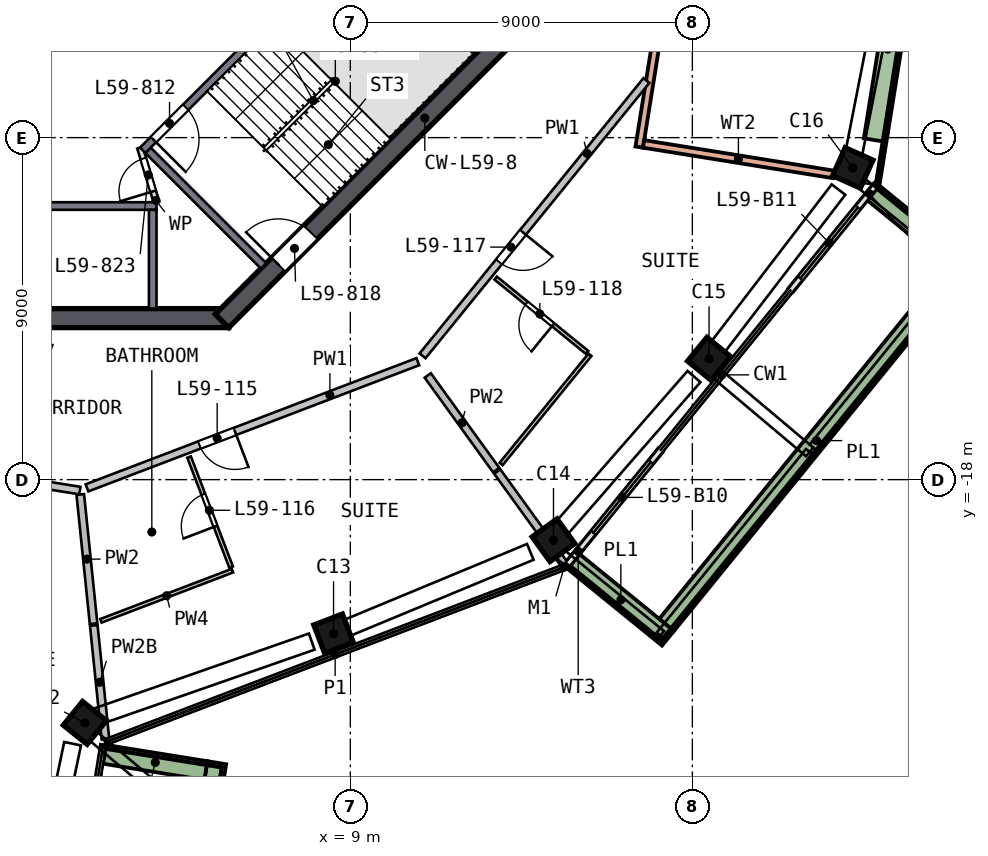
"""IFC4 building model, lengths in metres.
Left out: names, types, materials, properties, quantities, classifications, styles, units other than length and angle.
Written with IfcOpenShell. Run it as: python <this file> out.ifc"""

import sys

from ifc_helpers import new_model, si_unit, direction, frame, frame_2d, origin, origin_2d, place, context, subcontext, project, spatial, rectangle, extrude, element, fill, save


model = new_model("IFC4")
c1 = context("Model", 3, precision=1e-05, world=origin(), true_north=direction((0.0, 1.0)))
c2 = subcontext(c1, "Body", "Model", "MODEL_VIEW")
j1 = project(units=[si_unit("LENGTHUNIT", "METRE"), si_unit("PLANEANGLEUNIT", "RADIAN")], contexts=[c1])
p1 = place(None, origin())
s1 = spatial("IfcSite", under=j1, at=p1, CompositionType="ELEMENT")
p2 = place(p1, origin())
s2 = spatial("IfcBuilding", under=s1, at=p2, CompositionType="ELEMENT")
p3 = place(p2, frame((0.0, 0.0, 241.0)))
s3 = spatial("IfcBuildingStorey", under=s2, at=p3, CompositionType="ELEMENT", Elevation=241.0)
p4 = place(p3, frame((1.874, -24.414, 0.0), z_axis=(0.115997442, 0.009957841, 0.993199595), x_axis=(-0.623107576, -0.777974818, 0.080573769)))
e1 = element("IfcColumn", 1, at=p4, inside=s3, PredefinedType="COLUMN", context=c2, shape_type="SweptSolid", body=[
    extrude(rectangle(XDim=0.8, YDim=0.8, at=origin_2d()), origin(), (0.0, 0.0, 1.0), 3.212),
])
p5 = place(p3, frame((8.432, -22.105, 0.0), z_axis=(0.104794735, 0.040990103, 0.993648768), x_axis=(0.928416268, 0.354093219, -0.112522108)))
e2 = element("IfcColumn", 2, at=p5, inside=s3, PredefinedType="COLUMN", context=c2, shape_type="SweptSolid", body=[
    extrude(rectangle(XDim=0.8, YDim=0.8, at=origin_2d()), origin(), (0.0, 0.0, 1.0), 3.21),
])
p6 = place(p3, frame((14.234, -19.677, 0.0), z_axis=(0.092975475, 0.068496241, 0.993309532), x_axis=(-0.804692577, -0.582352668, 0.115478247)))
e3 = element("IfcColumn", 3, at=p6, inside=s3, PredefinedType="COLUMN", context=c2, shape_type="SweptSolid", body=[
    extrude(rectangle(XDim=0.8, YDim=0.8, at=origin_2d()), origin(), (0.0, 0.0, 1.0), 3.211),
])
p7 = place(p3, frame((18.355, -14.927, 0.0), z_axis=(0.070269074, 0.087836342, 0.993653377), x_axis=(0.627292241, 0.770618179, -0.112481404)))
e4 = element("IfcColumn", 4, at=p7, inside=s3, PredefinedType="COLUMN", context=c2, shape_type="SweptSolid", body=[
    extrude(rectangle(XDim=0.8, YDim=0.8, at=origin_2d()), origin(), (0.0, 0.0, 1.0), 3.21),
])
p8 = place(p3, frame((22.166, -9.924, 0.0), z_axis=(0.046297918, 0.10574779, 0.993314607), x_axis=(-0.406090601, -0.906512702, 0.115434589)))
e5 = element("IfcColumn", 5, at=p8, inside=s3, PredefinedType="COLUMN", context=c2, shape_type="SweptSolid", body=[
    extrude(rectangle(XDim=0.8, YDim=0.8, at=origin_2d()), origin(), (0.0, 0.0, 1.0), 3.211),
])
p9 = place(p3, frame((-5.799, -13.75, 0.0), z_axis=(0.0, 0.0, 1.0), x_axis=(1.0, 0.0, 0.0)))
e6 = element("IfcWall", 6, at=p9, inside=s3, PredefinedType="SHEAR", context=c2, shape_type="SweptSolid", body=[
    extrude(rectangle(XDim=11.598, YDim=0.5, at=frame_2d((5.799, 0.0))), origin(), (0.0, 0.0, 1.0), 3.5),
])
p10 = place(p3, frame((5.622, -13.823, 0.0), z_axis=(0.0, 0.0, 1.0), x_axis=(0.707106781, 0.707106781, 0.0)))
e7 = element("IfcWall", 7, at=p10, inside=s3, PredefinedType="SHEAR", context=c2, shape_type="SweptSolid", body=[
    extrude(rectangle(XDim=11.598, YDim=0.5, at=frame_2d((5.799, 0.0))), origin(), (0.0, 0.0, 1.0), 3.5),
])
p11 = place(p10, frame((2.099, 0.0, 0.0)))
e8 = element("IfcOpeningElement", 8, at=p11, cuts=e7, PredefinedType="OPENING", context=c2, shape_type="SweptSolid", body=[
    extrude(rectangle(XDim=1.2, YDim=2.1, at=frame_2d((0.6, 1.05))), frame((0.0, 0.26, 0.0), z_axis=(0.0, -1.0, 0.0), x_axis=(1.0, 0.0, 0.0)), (0.0, 0.0, 1.0), 0.52),
])
p12 = place(p3, frame((14.724, -20.224, 0.0), z_axis=(0.0, 0.0, 1.0), x_axis=(0.630963708, 0.775812348, 0.0)))
e9 = element("IfcWall", 9, at=p12, inside=s3, PredefinedType="SOLIDWALL", context=c2, shape_type="SweptSolid", body=[
    extrude(rectangle(XDim=3.863, YDim=0.15, at=frame_2d((1.932, 0.0))), origin(), (0.0, 0.0, 1.0), 2.525),
])
p13 = place(p12, frame((1.063, 0.0, 0.0)))
e10 = element("IfcOpeningElement", 10, at=p13, cuts=e9, PredefinedType="OPENING", context=c2, shape_type="SweptSolid", body=[
    extrude(rectangle(XDim=2.4, YDim=2.4, at=frame_2d((1.2, 1.2))), frame((0.0, 0.085, 0.0), z_axis=(0.0, -1.0, 0.0), x_axis=(1.0, 0.0, 0.0)), (0.0, 0.0, 1.0), 0.17),
])
p14 = place(p3, frame((20.589, -13.012, 0.0), z_axis=(0.0, 0.0, 1.0), x_axis=(0.630958196, 0.77581683, 0.0)))
e11 = element("IfcWall", 11, at=p14, inside=s3, PredefinedType="SOLIDWALL", context=c2, shape_type="SweptSolid", body=[
    extrude(rectangle(XDim=3.544, YDim=0.15, at=frame_2d((1.772, 0.0))), origin(), (0.0, 0.0, 1.0), 2.525),
])
p15 = place(p14, frame((0.4, 0.0, 0.0)))
e12 = element("IfcOpeningElement", 12, at=p15, cuts=e11, PredefinedType="OPENING", context=c2, shape_type="SweptSolid", body=[
    extrude(rectangle(XDim=2.4, YDim=2.4, at=frame_2d((1.2, 1.2))), frame((0.0, 0.085, 0.0), z_axis=(0.0, -1.0, 0.0), x_axis=(1.0, 0.0, 0.0)), (0.0, 0.0, 1.0), 0.17),
])
p16 = place(p3, frame((4.0, -34.704, 0.0), z_axis=(0.0, 0.0, 1.0), x_axis=(0.15850352, 0.987358412, 0.0)))
e13 = element("IfcWall", 13, at=p16, inside=s3, PredefinedType="SOLIDWALL", context=c2, shape_type="SweptSolid", body=[
    extrude(rectangle(XDim=9.373, YDim=0.5, at=frame_2d((4.686, 0.0))), origin(), (0.0, 0.0, 1.0), 0.7),
])
p17 = place(p3, frame((5.199, -25.657, 0.0), z_axis=(0.0, 0.0, 1.0), x_axis=(-0.98736148, 0.158484408, 0.0)))
e14 = element("IfcWall", 14, at=p17, inside=s3, PredefinedType="SOLIDWALL", context=c2, shape_type="SweptSolid", body=[
    extrude(rectangle(XDim=2.699, YDim=0.5, at=frame_2d((1.35, 0.0))), origin(), (0.0, 0.0, 1.0), 0.7),
])
p18 = place(p3, frame((14.878, -20.155, 0.0), z_axis=(0.0, 0.0, 1.0), x_axis=(0.775817424, -0.630957466, 0.0)))
e15 = element("IfcWall", 15, at=p18, inside=s3, PredefinedType="SOLIDWALL", context=c2, shape_type="SweptSolid", body=[
    extrude(rectangle(XDim=3.199, YDim=0.5, at=frame_2d((1.599, 0.0))), origin(), (0.0, 0.0, 1.0), 0.7),
])
p19 = place(p3, frame((17.323, -21.822, 0.0), z_axis=(0.0, 0.0, 1.0), x_axis=(0.63094623, 0.775826562, 0.0)))
e16 = element("IfcWall", 16, at=p19, inside=s3, PredefinedType="SOLIDWALL", context=c2, shape_type="SweptSolid", body=[
    extrude(rectangle(XDim=12.5, YDim=0.5, at=frame_2d((6.25, 0.0))), origin(), (0.0, 0.0, 1.0), 0.7),
])
p20 = place(p3, frame((24.858, -12.16, 0.0), z_axis=(0.0, 0.0, 1.0), x_axis=(-0.775840005, 0.6309297, 0.0)))
e17 = element("IfcWall", 17, at=p20, inside=s3, PredefinedType="SOLIDWALL", context=c2, shape_type="SweptSolid", body=[
    extrude(rectangle(XDim=2.699, YDim=0.5, at=frame_2d((1.35, 0.0))), origin(), (0.0, 0.0, 1.0), 0.7),
])
p21 = place(p3, frame((18.663, 3.587, 0.0), z_axis=(0.0, 0.0, 1.0), x_axis=(-0.158503194, -0.987358464, 0.0)))
e18 = element("IfcWall", 18, at=p21, inside=s3, PredefinedType="SOLIDWALL", context=c2, shape_type="SweptSolid", body=[
    extrude(rectangle(XDim=13.0, YDim=0.2, at=frame_2d((6.5, 0.0))), origin(), (0.0, 0.0, 1.0), 3.19),
])
p22 = place(p21, frame((5.6, 0.0, 0.0)))
e19 = element("IfcOpeningElement", 19, at=p22, cuts=e18, PredefinedType="OPENING", context=c2, shape_type="SweptSolid", body=[
    extrude(rectangle(XDim=1.8, YDim=2.4, at=frame_2d((0.9, 1.2))), frame((0.0, 0.11, 0.0), z_axis=(0.0, -1.0, 0.0), x_axis=(1.0, 0.0, 0.0)), (0.0, 0.0, 1.0), 0.22),
])
p23 = place(p3, frame((21.707, -9.967, 0.0), z_axis=(0.0, 0.0, 1.0), x_axis=(-0.987359411, 0.158497296, 0.0)))
e20 = element("IfcWall", 20, at=p23, inside=s3, PredefinedType="SOLIDWALL", context=c2, shape_type="SweptSolid", body=[
    extrude(rectangle(XDim=5.054, YDim=0.2, at=frame_2d((2.527, 0.0))), origin(), (0.0, 0.0, 1.0), 3.19),
])
p24 = place(p3, frame((22.885, -10.176, 0.0), z_axis=(0.0, 0.0, 1.0), x_axis=(0.158500684, 0.987358867, 0.0)))
e21 = element("IfcWall", 21, at=p24, inside=s3, PredefinedType="SOLIDWALL", context=c2, shape_type="SweptSolid", body=[
    extrude(rectangle(XDim=12.84, YDim=0.1, at=frame_2d((6.42, 0.0))), origin(), (0.0, 0.0, 1.0), 0.7),
])
p25 = place(p3, frame((22.76, -9.059, 0.0), z_axis=(0.0, 0.0, 1.0), x_axis=(0.158494452, 0.987359868, 0.0)))
e22 = element("IfcWall", 22, at=p25, inside=s3, PredefinedType="SOLIDWALL", context=c2, shape_type="SweptSolid", body=[
    extrude(rectangle(XDim=4.837, YDim=0.5, at=frame_2d((2.418, 0.0))), origin(), (0.0, 0.0, 1.0), 0.7),
])
p26 = place(p3, frame((-3.9, -10.8, 0.0), z_axis=(0.0, 0.0, 1.0), x_axis=(1.0, 0.0, 0.0)))
e23 = element("IfcWall", 23, at=p26, inside=s3, PredefinedType="SOLIDWALL", context=c2, shape_type="SweptSolid", body=[
    extrude(rectangle(XDim=7.8, YDim=0.2, at=frame_2d((3.9, 0.0))), origin(), (0.0, 0.0, 1.0), 3.19),
])
p27 = place(p26, frame((3.45, 0.0, 0.0)))
e24 = element("IfcOpeningElement", 24, at=p27, cuts=e23, PredefinedType="OPENING", context=c2, shape_type="SweptSolid", body=[
    extrude(rectangle(XDim=0.9, YDim=2.1, at=frame_2d((0.45, 1.05))), frame((0.0, 0.11, 0.0), z_axis=(0.0, -1.0, 0.0), x_axis=(1.0, 0.0, 0.0)), (0.0, 0.0, 1.0), 0.22),
])
p28 = place(p3, frame((3.8, -10.9, 0.0), z_axis=(0.0, 0.0, 1.0), x_axis=(0.0, -1.0, 0.0)))
e25 = element("IfcWall", 25, at=p28, inside=s3, PredefinedType="SOLIDWALL", context=c2, shape_type="SweptSolid", body=[
    extrude(rectangle(XDim=2.6, YDim=0.2, at=frame_2d((1.3, 0.0))), origin(), (0.0, 0.0, 1.0), 3.19),
])
p29 = place(p3, frame((9.629, -3.24, 0.0), z_axis=(0.0, 0.0, 1.0), x_axis=(-0.707120946, -0.707092617, 0.0)))
e26 = element("IfcWall", 26, at=p29, inside=s3, PredefinedType="SOLIDWALL", context=c2, shape_type="SweptSolid", body=[
    extrude(rectangle(XDim=8.618, YDim=0.2, at=frame_2d((4.309, 0.0))), origin(), (0.0, 0.0, 1.0), 3.19),
])
p30 = place(p29, frame((7.018, 0.0, 0.0)))
e27 = element("IfcOpeningElement", 27, at=p30, cuts=e26, PredefinedType="OPENING", context=c2, shape_type="SweptSolid", body=[
    extrude(rectangle(XDim=1.2, YDim=2.1, at=frame_2d((0.6, 1.05))), frame((0.0, 0.11, 0.0), z_axis=(0.0, -1.0, 0.0), x_axis=(1.0, 0.0, 0.0)), (0.0, 0.0, 1.0), 0.22),
])
for number, where, z_axis, x_axis in (
    (28, (3.677, -9.334, 0.0), (0.0, 0.0, 1.0), (0.707, -0.707, 0.0)),
    (29, (9.334, -3.677, 0.0), (0.0, 0.0, 1.0), (0.707, -0.707, 0.0)),
):
    element("IfcWall", number, at=place(p3, frame(where, z_axis=z_axis, x_axis=x_axis)), inside=s3, PredefinedType="SOLIDWALL", context=c2, shape_type="SweptSolid", body=[
        extrude(rectangle(XDim=4.3, YDim=0.2, at=frame_2d((2.15, 0.0))), origin(), (0.0, 0.0, 1.0), 3.19),
    ])
p31 = place(p3, frame((3.9, -10.7, 0.0), z_axis=(0.0, 0.0, 1.0), x_axis=(-0.289808785, 0.957084567, 0.0)))
e30 = element("IfcWall", 30, at=p31, inside=s3, PredefinedType="PARTITIONING", context=c2, shape_type="SweptSolid", body=[
    extrude(rectangle(XDim=1.501, YDim=0.15, at=frame_2d((0.75, 0.0))), origin(), (0.0, 0.0, 1.0), 3.19),
])
p32 = place(p31, frame((0.301, 0.0, 0.0)))
e31 = element("IfcOpeningElement", 31, at=p32, cuts=e30, PredefinedType="OPENING", context=c2, shape_type="SweptSolid", body=[
    extrude(rectangle(XDim=0.9, YDim=2.1, at=frame_2d((0.45, 1.05))), frame((0.0, 0.085, 0.0), z_axis=(0.0, -1.0, 0.0), x_axis=(1.0, 0.0, 0.0)), (0.0, 0.0, 1.0), 0.17),
])
p33 = place(p3, frame((1.883, -18.288, 0.0), z_axis=(0.0, 0.0, 1.0), x_axis=(-0.987356604, 0.158514786, 0.0)))
e32 = element("IfcWall", 32, at=p33, inside=s3, PredefinedType="SOLIDWALL", context=c2, shape_type="SweptSolid", body=[
    extrude(rectangle(XDim=9.316, YDim=0.2, at=frame_2d((4.658, 0.0))), origin(), (0.0, 0.0, 1.0), 3.19),
])
p34 = place(p33, frame((3.833, 0.0, 0.0)))
e33 = element("IfcOpeningElement", 33, at=p34, cuts=e32, PredefinedType="OPENING", context=c2, shape_type="SweptSolid", body=[
    extrude(rectangle(XDim=1.8, YDim=2.1, at=frame_2d((0.9, 1.05))), frame((0.0, 0.11, 0.0), z_axis=(0.0, -1.0, 0.0), x_axis=(1.0, 0.0, 0.0)), (0.0, 0.0, 1.0), 0.22),
])
p35 = place(p3, frame((10.775, -14.896, 0.0), z_axis=(0.0, 0.0, 1.0), x_axis=(-0.93432948, -0.356410469, 0.0)))
e34 = element("IfcWall", 34, at=p35, inside=s3, PredefinedType="SOLIDWALL", context=c2, shape_type="SweptSolid", body=[
    extrude(rectangle(XDim=9.317, YDim=0.2, at=frame_2d((4.658, 0.0))), origin(), (0.0, 0.0, 1.0), 3.19),
])
p36 = place(p35, frame((5.15, 0.0, 0.0)))
e35 = element("IfcOpeningElement", 35, at=p36, cuts=e34, PredefinedType="OPENING", context=c2, shape_type="SweptSolid", body=[
    extrude(rectangle(XDim=1.0, YDim=2.1, at=frame_2d((0.5, 1.05))), frame((0.0, 0.11, 0.0), z_axis=(0.0, -1.0, 0.0), x_axis=(1.0, 0.0, 0.0)), (0.0, 0.0, 1.0), 0.22),
])
p37 = place(p3, frame((16.792, -7.497, 0.0), z_axis=(0.0, 0.0, 1.0), x_axis=(-0.630941046, -0.775830778, 0.0)))
e36 = element("IfcWall", 36, at=p37, inside=s3, PredefinedType="SOLIDWALL", context=c2, shape_type="SweptSolid", body=[
    extrude(rectangle(XDim=9.337, YDim=0.2, at=frame_2d((4.668, 0.0))), origin(), (0.0, 0.0, 1.0), 3.19),
])
p38 = place(p37, frame((5.15, 0.0, 0.0)))
e37 = element("IfcOpeningElement", 37, at=p38, cuts=e36, PredefinedType="OPENING", context=c2, shape_type="SweptSolid", body=[
    extrude(rectangle(XDim=1.0, YDim=2.1, at=frame_2d((0.5, 1.05))), frame((0.0, 0.11, 0.0), z_axis=(0.0, -1.0, 0.0), x_axis=(1.0, 0.0, 0.0)), (0.0, 0.0, 1.0), 0.22),
])
p39 = place(p3, frame((1.894, -18.391, 0.0), z_axis=(0.0, 0.0, 1.0), x_axis=(0.102416674, -0.994741587, 0.0)))
e38 = element("IfcWall", 38, at=p39, inside=s3, PredefinedType="SOLIDWALL", context=c2, shape_type="SweptSolid", body=[
    extrude(rectangle(XDim=3.418, YDim=0.2, at=frame_2d((1.709, 0.0))), origin(), (0.0, 0.0, 1.0), 3.19),
])
p40 = place(p3, frame((2.249, -21.837, 0.0), z_axis=(0.0, 0.0, 1.0), x_axis=(0.102553406, -0.9947275, 0.0)))
e39 = element("IfcWall", 39, at=p40, inside=s3, PredefinedType="SOLIDWALL", context=c2, shape_type="SweptSolid", body=[
    extrude(rectangle(XDim=3.011, YDim=0.2, at=frame_2d((1.506, 0.0))), origin(), (0.0, 0.0, 1.0), 2.69),
])
p41 = place(p3, frame((11.037, -15.259, 0.0), z_axis=(0.0, 0.0, 1.0), x_axis=(0.586087623, -0.810247677, 0.0)))
e40 = element("IfcWall", 40, at=p41, inside=s3, PredefinedType="SOLIDWALL", context=c2, shape_type="SweptSolid", body=[
    extrude(rectangle(XDim=3.075, YDim=0.2, at=frame_2d((1.537, 0.0))), origin(), (0.0, 0.0, 1.0), 3.19),
])
p42 = place(p3, frame((12.866, -17.787, 0.0), z_axis=(0.0, 0.0, 1.0), x_axis=(0.586082417, -0.810251443, 0.0)))
e41 = element("IfcWall", 41, at=p42, inside=s3, PredefinedType="SOLIDWALL", context=c2, shape_type="SweptSolid", body=[
    extrude(rectangle(XDim=3.011, YDim=0.2, at=frame_2d((1.506, 0.0))), origin(), (0.0, 0.0, 1.0), 3.19),
])
p43 = place(p3, frame((5.898, -20.396, 0.0), z_axis=(0.0, 0.0, 1.0), x_axis=(-0.934312202, -0.356455759, 0.0)))
e42 = element("IfcWall", 42, at=p43, inside=s3, PredefinedType="PARTITIONING", context=c2, shape_type="SweptSolid", body=[
    extrude(rectangle(XDim=3.704, YDim=0.1, at=frame_2d((1.852, 0.0))), origin(), (0.0, 0.0, 1.0), 3.19),
])
p44 = place(p3, frame((5.863, -20.302, 0.0), z_axis=(0.0, 0.0, 1.0), x_axis=(-0.356391594, 0.93433668, 0.0)))
e43 = element("IfcWall", 43, at=p44, inside=s3, PredefinedType="PARTITIONING", context=c2, shape_type="SweptSolid", body=[
    extrude(rectangle(XDim=3.1, YDim=0.1, at=frame_2d((1.55, 0.0))), origin(), (0.0, 0.0, 1.0), 3.19),
])
p45 = place(p44, frame((1.15, 0.0, 0.0)))
e44 = element("IfcOpeningElement", 44, at=p45, cuts=e43, PredefinedType="OPENING", context=c2, shape_type="SweptSolid", body=[
    extrude(rectangle(XDim=0.9, YDim=2.1, at=frame_2d((0.45, 1.05))), frame((0.0, 0.06, 0.0), z_axis=(0.0, -1.0, 0.0), x_axis=(1.0, 0.0, 0.0)), (0.0, 0.0, 1.0), 0.12),
])
p46 = place(p3, frame((15.228, -14.651, 0.0), z_axis=(0.0, 0.0, 1.0), x_axis=(-0.775834504, 0.630936464, 0.0)))
e45 = element("IfcWall", 45, at=p46, inside=s3, PredefinedType="PARTITIONING", context=c2, shape_type="SweptSolid", body=[
    extrude(rectangle(XDim=3.1, YDim=0.1, at=frame_2d((1.55, 0.0))), origin(), (0.0, 0.0, 1.0), 3.19),
])
p47 = place(p46, frame((1.15, 0.0, 0.0)))
e46 = element("IfcOpeningElement", 46, at=p47, cuts=e45, PredefinedType="OPENING", context=c2, shape_type="SweptSolid", body=[
    extrude(rectangle(XDim=0.9, YDim=2.1, at=frame_2d((0.45, 1.05))), frame((0.0, 0.06, 0.0), z_axis=(0.0, -1.0, 0.0), x_axis=(1.0, 0.0, 0.0)), (0.0, 0.0, 1.0), 0.12),
])
p48 = place(p3, frame((15.306, -14.714, 0.0), z_axis=(0.0, 0.0, 1.0), x_axis=(-0.630952346, -0.775821588, 0.0)))
e47 = element("IfcWall", 47, at=p48, inside=s3, PredefinedType="PARTITIONING", context=c2, shape_type="SweptSolid", body=[
    extrude(rectangle(XDim=3.704, YDim=0.1, at=frame_2d((1.852, 0.0))), origin(), (0.0, 0.0, 1.0), 3.19),
])
p49 = place(p13, origin())
e48 = element("IfcDoor", 48, at=p49, inside=s3, OperationType="SLIDING_TO_LEFT", PredefinedType="DOOR", context=c2, shape_type="SweptSolid", body=[
    extrude(rectangle(XDim=2.4, YDim=2.4, at=frame_2d((1.2, 1.2))), frame((0.0, 0.025, 0.0), z_axis=(0.0, -1.0, 0.0), x_axis=(1.0, 0.0, 0.0)), (0.0, 0.0, 1.0), 0.05),
])
fill(e10, e48)
p50 = place(p15, origin())
e49 = element("IfcDoor", 49, at=p50, inside=s3, OperationType="SLIDING_TO_RIGHT", PredefinedType="DOOR", context=c2, shape_type="SweptSolid", body=[
    extrude(rectangle(XDim=2.4, YDim=2.4, at=frame_2d((1.2, 1.2))), frame((0.0, 0.025, 0.0), z_axis=(0.0, -1.0, 0.0), x_axis=(1.0, 0.0, 0.0)), (0.0, 0.0, 1.0), 0.05),
])
fill(e12, e49)
p51 = place(p30, origin())
e50 = element("IfcDoor", 50, at=p51, inside=s3, OperationType="SINGLE_SWING_RIGHT", PredefinedType="DOOR", context=c2, shape_type="SweptSolid", body=[
    extrude(rectangle(XDim=1.2, YDim=2.1, at=frame_2d((0.6, 1.05))), frame((0.0, 0.025, 0.0), z_axis=(0.0, -1.0, 0.0), x_axis=(1.0, 0.0, 0.0)), (0.0, 0.0, 1.0), 0.05),
])
fill(e27, e50)
p52 = place(p11, origin())
e51 = element("IfcDoor", 51, at=p52, inside=s3, OperationType="SINGLE_SWING_LEFT", PredefinedType="DOOR", context=c2, shape_type="SweptSolid", body=[
    extrude(rectangle(XDim=1.2, YDim=2.1, at=frame_2d((0.6, 1.05))), frame((0.0, 0.025, 0.0), z_axis=(0.0, -1.0, 0.0), x_axis=(1.0, 0.0, 0.0)), (0.0, 0.0, 1.0), 0.05),
])
fill(e8, e51)
p53 = place(p32, origin())
e52 = element("IfcDoor", 52, at=p53, inside=s3, OperationType="SINGLE_SWING_LEFT", PredefinedType="DOOR", context=c2, shape_type="SweptSolid", body=[
    extrude(rectangle(XDim=0.9, YDim=2.1, at=frame_2d((0.45, 1.05))), frame((0.0, 0.025, 0.0), z_axis=(0.0, -1.0, 0.0), x_axis=(1.0, 0.0, 0.0)), (0.0, 0.0, 1.0), 0.05),
])
fill(e31, e52)
p54 = place(p36, origin())
e53 = element("IfcDoor", 53, at=p54, inside=s3, OperationType="SINGLE_SWING_LEFT", PredefinedType="DOOR", context=c2, shape_type="SweptSolid", body=[
    extrude(rectangle(XDim=1.0, YDim=2.1, at=frame_2d((0.5, 1.05))), frame((0.0, 0.025, 0.0), z_axis=(0.0, -1.0, 0.0), x_axis=(1.0, 0.0, 0.0)), (0.0, 0.0, 1.0), 0.05),
])
fill(e35, e53)
p55 = place(p45, origin())
e54 = element("IfcDoor", 54, at=p55, inside=s3, OperationType="SINGLE_SWING_LEFT", PredefinedType="DOOR", context=c2, shape_type="SweptSolid", body=[
    extrude(rectangle(XDim=0.9, YDim=2.1, at=frame_2d((0.45, 1.05))), frame((0.0, 0.025, 0.0), z_axis=(0.0, -1.0, 0.0), x_axis=(1.0, 0.0, 0.0)), (0.0, 0.0, 1.0), 0.05),
])
fill(e44, e54)
p56 = place(p38, origin())
e55 = element("IfcDoor", 55, at=p56, inside=s3, OperationType="SINGLE_SWING_LEFT", PredefinedType="DOOR", context=c2, shape_type="SweptSolid", body=[
    extrude(rectangle(XDim=1.0, YDim=2.1, at=frame_2d((0.5, 1.05))), frame((0.0, 0.025, 0.0), z_axis=(0.0, -1.0, 0.0), x_axis=(1.0, 0.0, 0.0)), (0.0, 0.0, 1.0), 0.05),
])
fill(e37, e55)
p57 = place(p47, origin())
e56 = element("IfcDoor", 56, at=p57, inside=s3, OperationType="SINGLE_SWING_LEFT", PredefinedType="DOOR", context=c2, shape_type="SweptSolid", body=[
    extrude(rectangle(XDim=0.9, YDim=2.1, at=frame_2d((0.45, 1.05))), frame((0.0, 0.025, 0.0), z_axis=(0.0, -1.0, 0.0), x_axis=(1.0, 0.0, 0.0)), (0.0, 0.0, 1.0), 0.05),
])
fill(e46, e56)
save(model, sys.argv[1])
